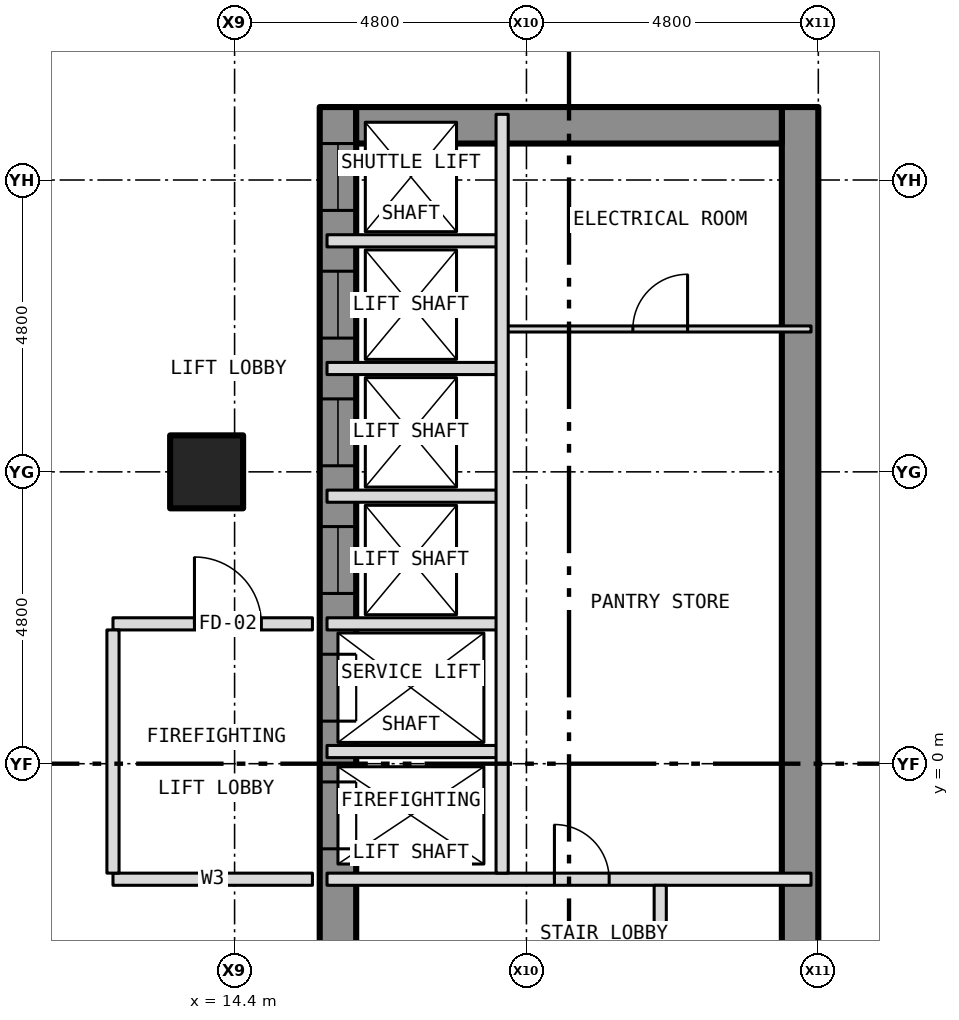
"""IFC4 building model, lengths in metres.
Left out: names, types, materials, properties, quantities, classifications, styles, units other than length and angle.
Written with IfcOpenShell. Run it as: python <this file> out.ifc"""

import sys

from ifc_helpers import new_model, si_unit, direction, frame, frame_2d, origin, origin_2d, place, context, subcontext, project, spatial, rectangle, hollow_rectangle, extrude, element, fill, save


model = new_model("IFC4")
c1 = context("Model", 3, precision=1e-05, world=origin(), true_north=direction((0.0, 1.0)))
c2 = subcontext(c1, "Body", "Model", "MODEL_VIEW")
j1 = project(units=[si_unit("LENGTHUNIT", "METRE"), si_unit("PLANEANGLEUNIT", "RADIAN")], contexts=[c1])
p1 = place(None, origin())
s1 = spatial("IfcSite", under=j1, at=p1, CompositionType="ELEMENT")
p2 = place(p1, origin())
s2 = spatial("IfcBuilding", under=s1, at=p2, CompositionType="ELEMENT")
p3 = place(p2, origin())
s3 = spatial("IfcBuildingStorey", under=s2, at=p3, CompositionType="ELEMENT", Elevation=0.0)
p4 = place(p3, frame((13.94, 4.8, -0.3), z_axis=(0.0, 0.0, 1.0), x_axis=(1.0, 0.0, 0.0)))
e1 = element("IfcColumn", 1, at=p4, inside=s3, PredefinedType="COLUMN", context=c2, shape_type="SweptSolid", body=[
    extrude(hollow_rectangle(XDim=1.2, YDim=1.2, WallThickness=0.07, at=origin_2d()), origin(), (0.0, 0.0, 1.0), 7.55),
])
p5 = place(p3, frame((16.1, -10.8, 0.0), z_axis=(0.0, 0.0, 1.0), x_axis=(0.0, 1.0, 0.0)))
e2 = element("IfcWall", 2, at=p5, inside=s3, PredefinedType="SHEAR", context=c2, shape_type="SweptSolid", body=[
    extrude(rectangle(XDim=21.6, YDim=0.6, at=frame_2d((10.8, 0.0))), origin(), (0.0, 0.0, 1.0), 7.2),
])
p6 = place(p5, frame((9.4, 0.0, 0.0)))
e3 = element("IfcOpeningElement", 3, at=p6, cuts=e2, PredefinedType="OPENING", context=c2, shape_type="SweptSolid", body=[
    extrude(rectangle(XDim=1.1, YDim=2.1, at=frame_2d((0.55, 1.05))), frame((0.0, 0.312, 0.0), z_axis=(0.0, -1.0, 0.0), x_axis=(1.0, 0.0, 0.0)), (0.0, 0.0, 1.0), 0.624),
])
p7 = place(p5, frame((11.5, 0.0, 0.0)))
e4 = element("IfcOpeningElement", 4, at=p7, cuts=e2, PredefinedType="OPENING", context=c2, shape_type="SweptSolid", body=[
    extrude(rectangle(XDim=1.1, YDim=2.1, at=frame_2d((0.55, 1.05))), frame((0.0, 0.312, 0.0), z_axis=(0.0, -1.0, 0.0), x_axis=(1.0, 0.0, 0.0)), (0.0, 0.0, 1.0), 0.624),
])
p8 = place(p5, frame((13.6, 0.0, 0.0)))
e5 = element("IfcOpeningElement", 5, at=p8, cuts=e2, PredefinedType="OPENING", context=c2, shape_type="SweptSolid", body=[
    extrude(rectangle(XDim=1.1, YDim=2.1, at=frame_2d((0.55, 1.05))), frame((0.0, 0.312, 0.0), z_axis=(0.0, -1.0, 0.0), x_axis=(1.0, 0.0, 0.0)), (0.0, 0.0, 1.0), 0.624),
])
p9 = place(p5, frame((15.7, 0.0, 0.0)))
e6 = element("IfcOpeningElement", 6, at=p9, cuts=e2, PredefinedType="OPENING", context=c2, shape_type="SweptSolid", body=[
    extrude(rectangle(XDim=1.1, YDim=2.1, at=frame_2d((0.55, 1.05))), frame((0.0, 0.312, 0.0), z_axis=(0.0, -1.0, 0.0), x_axis=(1.0, 0.0, 0.0)), (0.0, 0.0, 1.0), 0.624),
])
p10 = place(p5, frame((17.8, 0.0, 0.0)))
e7 = element("IfcOpeningElement", 7, at=p10, cuts=e2, PredefinedType="OPENING", context=c2, shape_type="SweptSolid", body=[
    extrude(rectangle(XDim=1.1, YDim=2.1, at=frame_2d((0.55, 1.05))), frame((0.0, 0.312, 0.0), z_axis=(0.0, -1.0, 0.0), x_axis=(1.0, 0.0, 0.0)), (0.0, 0.0, 1.0), 0.624),
])
p11 = place(p5, frame((19.9, 0.0, 0.0)))
e8 = element("IfcOpeningElement", 8, at=p11, cuts=e2, PredefinedType="OPENING", context=c2, shape_type="SweptSolid", body=[
    extrude(rectangle(XDim=1.1, YDim=2.1, at=frame_2d((0.55, 1.05))), frame((0.0, 0.312, 0.0), z_axis=(0.0, -1.0, 0.0), x_axis=(1.0, 0.0, 0.0)), (0.0, 0.0, 1.0), 0.624),
])
p12 = place(p3, frame((23.7, -10.8, 0.0), z_axis=(0.0, 0.0, 1.0), x_axis=(0.0, 1.0, 0.0)))
e9 = element("IfcWall", 9, at=p12, inside=s3, PredefinedType="SHEAR", context=c2, shape_type="SweptSolid", body=[
    extrude(rectangle(XDim=21.6, YDim=0.6, at=frame_2d((10.8, 0.0))), origin(), (0.0, 0.0, 1.0), 7.2),
])
p13 = place(p3, frame((16.4, 10.5, 0.0), z_axis=(0.0, 0.0, 1.0), x_axis=(1.0, 0.0, 0.0)))
e10 = element("IfcWall", 10, at=p13, inside=s3, PredefinedType="SHEAR", context=c2, shape_type="SweptSolid", body=[
    extrude(rectangle(XDim=7.0, YDim=0.6, at=frame_2d((3.5, 0.0))), origin(), (0.0, 0.0, 1.0), 7.2),
])
p14 = place(p3, frame((12.4, -1.9, 0.0), z_axis=(0.0, 0.0, 1.0), x_axis=(1.0, 0.0, 0.0)))
e11 = element("IfcWall", 11, at=p14, inside=s3, PredefinedType="PARTITIONING", context=c2, shape_type="SweptSolid", body=[
    extrude(rectangle(XDim=3.28, YDim=0.2, at=frame_2d((1.64, 0.0))), origin(), (0.0, 0.0, 1.0), 7.25),
])
p15 = place(p3, frame((15.92, -1.9, 0.0), z_axis=(0.0, 0.0, 1.0), x_axis=(1.0, 0.0, 0.0)))
e12 = element("IfcWall", 12, at=p15, inside=s3, PredefinedType="PARTITIONING", context=c2, shape_type="SweptSolid", body=[
    extrude(rectangle(XDim=7.96, YDim=0.2, at=frame_2d((3.98, 0.0))), origin(), (0.0, 0.0, 1.0), 7.2),
])
p16 = place(p15, frame((3.74, 0.0, 0.0)))
e13 = element("IfcOpeningElement", 13, at=p16, cuts=e12, PredefinedType="OPENING", context=c2, shape_type="SweptSolid", body=[
    extrude(rectangle(XDim=0.9, YDim=2.1, at=frame_2d((0.45, 1.05))), frame((0.0, 0.112, 0.0), z_axis=(0.0, -1.0, 0.0), x_axis=(1.0, 0.0, 0.0)), (0.0, 0.0, 1.0), 0.224),
])
p17 = place(p3, frame((15.92, 0.2, 0.0), z_axis=(0.0, 0.0, 1.0), x_axis=(1.0, 0.0, 0.0)))
e14 = element("IfcWall", 14, at=p17, inside=s3, PredefinedType="PARTITIONING", context=c2, shape_type="SweptSolid", body=[
    extrude(rectangle(XDim=2.88, YDim=0.2, at=frame_2d((1.44, 0.0))), origin(), (0.0, 0.0, 1.0), 7.2),
])
p18 = place(p3, frame((12.4, 2.3, 0.0), z_axis=(0.0, 0.0, 1.0), x_axis=(1.0, 0.0, 0.0)))
e15 = element("IfcWall", 15, at=p18, inside=s3, PredefinedType="PARTITIONING", context=c2, shape_type="SweptSolid", body=[
    extrude(rectangle(XDim=3.28, YDim=0.2, at=frame_2d((1.64, 0.0))), origin(), (0.0, 0.0, 1.0), 7.25),
])
p19 = place(p18, frame((1.34, 0.0, 0.0)))
e16 = element("IfcOpeningElement", 16, at=p19, cuts=e15, PredefinedType="OPENING", context=c2, shape_type="SweptSolid", body=[
    extrude(rectangle(XDim=1.1, YDim=2.1, at=frame_2d((0.55, 1.05))), frame((0.0, 0.112, 0.0), z_axis=(0.0, -1.0, 0.0), x_axis=(1.0, 0.0, 0.0)), (0.0, 0.0, 1.0), 0.224),
])
for number, where, z_axis, x_axis in (
    (17, (15.92, 2.3, 0.0), (0.0, 0.0, 1.0), (1.0, 0.0, 0.0)),
    (18, (15.92, 4.4, 0.0), (0.0, 0.0, 1.0), (1.0, 0.0, 0.0)),
    (19, (15.92, 6.5, 0.0), (0.0, 0.0, 1.0), (1.0, 0.0, 0.0)),
):
    element("IfcWall", number, at=place(p3, frame(where, z_axis=z_axis, x_axis=x_axis)), inside=s3, PredefinedType="PARTITIONING", context=c2, shape_type="SweptSolid", body=[
        extrude(rectangle(XDim=2.88, YDim=0.2, at=frame_2d((1.44, 0.0))), origin(), (0.0, 0.0, 1.0), 7.2),
    ])
p20 = place(p3, frame((18.8, 7.15, 0.0), z_axis=(0.0, 0.0, 1.0), x_axis=(1.0, 0.0, 0.0)))
e20 = element("IfcWall", 20, at=p20, inside=s3, PredefinedType="PARTITIONING", context=c2, shape_type="SweptSolid", body=[
    extrude(rectangle(XDim=5.08, YDim=0.1, at=frame_2d((2.54, 0.0))), origin(), (0.0, 0.0, 1.0), 7.2),
])
p21 = place(p20, frame((2.15, 0.0, 0.0)))
e21 = element("IfcOpeningElement", 21, at=p21, cuts=e20, PredefinedType="OPENING", context=c2, shape_type="SweptSolid", body=[
    extrude(rectangle(XDim=0.9, YDim=2.1, at=frame_2d((0.45, 1.05))), frame((0.0, 0.062, 0.0), z_axis=(0.0, -1.0, 0.0), x_axis=(1.0, 0.0, 0.0)), (0.0, 0.0, 1.0), 0.124),
])
p22 = place(p3, frame((15.92, 8.6, 0.0), z_axis=(0.0, 0.0, 1.0), x_axis=(1.0, 0.0, 0.0)))
e22 = element("IfcWall", 22, at=p22, inside=s3, PredefinedType="PARTITIONING", context=c2, shape_type="SweptSolid", body=[
    extrude(rectangle(XDim=2.88, YDim=0.2, at=frame_2d((1.44, 0.0))), origin(), (0.0, 0.0, 1.0), 7.2),
])
p23 = place(p3, frame((12.4, -1.8, 0.0), z_axis=(0.0, 0.0, 1.0), x_axis=(0.0, 1.0, 0.0)))
e23 = element("IfcWall", 23, at=p23, inside=s3, PredefinedType="PARTITIONING", context=c2, shape_type="SweptSolid", body=[
    extrude(rectangle(XDim=4.0, YDim=0.2, at=frame_2d((2.0, 0.0))), origin(), (0.0, 0.0, 1.0), 7.25),
])
p24 = place(p3, frame((18.8, -1.8, 0.0), z_axis=(0.0, 0.0, 1.0), x_axis=(0.0, 1.0, 0.0)))
e24 = element("IfcWall", 24, at=p24, inside=s3, PredefinedType="PARTITIONING", context=c2, shape_type="SweptSolid", body=[
    extrude(rectangle(XDim=12.48, YDim=0.2, at=frame_2d((6.24, 0.0))), origin(), (0.0, 0.0, 1.0), 7.2),
])
p25 = place(p3, frame((21.4, -10.68, 0.0), z_axis=(0.0, 0.0, 1.0), x_axis=(0.0, 1.0, 0.0)))
e25 = element("IfcWall", 25, at=p25, inside=s3, PredefinedType="PARTITIONING", context=c2, shape_type="SweptSolid", body=[
    extrude(rectangle(XDim=8.68, YDim=0.2, at=frame_2d((4.34, 0.0))), origin(), (0.0, 0.0, 1.0), 7.2),
])
p26 = place(p25, frame((5.66, 0.0, 0.0)))
e26 = element("IfcOpeningElement", 26, at=p26, cuts=e25, PredefinedType="OPENING", context=c2, shape_type="SweptSolid", body=[
    extrude(rectangle(XDim=0.9, YDim=2.1, at=frame_2d((0.45, 1.05))), frame((0.0, 0.112, 0.0), z_axis=(0.0, -1.0, 0.0), x_axis=(1.0, 0.0, 0.0)), (0.0, 0.0, 1.0), 0.224),
])
p27 = place(p25, frame((0.74, 0.0, 0.0)))
e27 = element("IfcOpeningElement", 27, at=p27, cuts=e25, PredefinedType="OPENING", context=c2, shape_type="SweptSolid", body=[
    extrude(rectangle(XDim=1.1, YDim=2.1, at=frame_2d((0.55, 1.05))), frame((0.0, 0.112, 0.0), z_axis=(0.0, -1.0, 0.0), x_axis=(1.0, 0.0, 0.0)), (0.0, 0.0, 1.0), 0.224),
])
p28 = place(p6, origin())
e28 = element("IfcDoor", 28, at=p28, inside=s3, OperationType="SLIDING_TO_LEFT", PredefinedType="DOOR", context=c2, shape_type="SweptSolid", body=[
    extrude(rectangle(XDim=1.1, YDim=2.1, at=frame_2d((0.55, 1.05))), frame((0.0, 0.025, 0.0), z_axis=(0.0, -1.0, 0.0), x_axis=(1.0, 0.0, 0.0)), (0.0, 0.0, 1.0), 0.05),
])
fill(e3, e28)
p29 = place(p7, origin())
e29 = element("IfcDoor", 29, at=p29, inside=s3, OperationType="SLIDING_TO_LEFT", PredefinedType="DOOR", context=c2, shape_type="SweptSolid", body=[
    extrude(rectangle(XDim=1.1, YDim=2.1, at=frame_2d((0.55, 1.05))), frame((0.0, 0.025, 0.0), z_axis=(0.0, -1.0, 0.0), x_axis=(1.0, 0.0, 0.0)), (0.0, 0.0, 1.0), 0.05),
])
fill(e4, e29)
p30 = place(p8, origin())
e30 = element("IfcDoor", 30, at=p30, inside=s3, OperationType="SLIDING_TO_LEFT", PredefinedType="DOOR", context=c2, shape_type="SweptSolid", body=[
    extrude(rectangle(XDim=1.1, YDim=2.1, at=frame_2d((0.55, 1.05))), frame((0.0, 0.025, 0.0), z_axis=(0.0, -1.0, 0.0), x_axis=(1.0, 0.0, 0.0)), (0.0, 0.0, 1.0), 0.05),
])
fill(e5, e30)
p31 = place(p9, origin())
e31 = element("IfcDoor", 31, at=p31, inside=s3, OperationType="SLIDING_TO_LEFT", PredefinedType="DOOR", context=c2, shape_type="SweptSolid", body=[
    extrude(rectangle(XDim=1.1, YDim=2.1, at=frame_2d((0.55, 1.05))), frame((0.0, 0.025, 0.0), z_axis=(0.0, -1.0, 0.0), x_axis=(1.0, 0.0, 0.0)), (0.0, 0.0, 1.0), 0.05),
])
fill(e6, e31)
p32 = place(p10, origin())
e32 = element("IfcDoor", 32, at=p32, inside=s3, OperationType="SLIDING_TO_LEFT", PredefinedType="DOOR", context=c2, shape_type="SweptSolid", body=[
    extrude(rectangle(XDim=1.1, YDim=2.1, at=frame_2d((0.55, 1.05))), frame((0.0, 0.025, 0.0), z_axis=(0.0, -1.0, 0.0), x_axis=(1.0, 0.0, 0.0)), (0.0, 0.0, 1.0), 0.05),
])
fill(e7, e32)
p33 = place(p11, origin())
e33 = element("IfcDoor", 33, at=p33, inside=s3, OperationType="SLIDING_TO_LEFT", PredefinedType="DOOR", context=c2, shape_type="SweptSolid", body=[
    extrude(rectangle(XDim=1.1, YDim=2.1, at=frame_2d((0.55, 1.05))), frame((0.0, 0.025, 0.0), z_axis=(0.0, -1.0, 0.0), x_axis=(1.0, 0.0, 0.0)), (0.0, 0.0, 1.0), 0.05),
])
fill(e8, e33)
p34 = place(p16, origin())
e34 = element("IfcDoor", 34, at=p34, inside=s3, OperationType="SINGLE_SWING_LEFT", PredefinedType="DOOR", context=c2, shape_type="SweptSolid", body=[
    extrude(rectangle(XDim=0.9, YDim=2.1, at=frame_2d((0.45, 1.05))), frame((0.0, 0.025, 0.0), z_axis=(0.0, -1.0, 0.0), x_axis=(1.0, 0.0, 0.0)), (0.0, 0.0, 1.0), 0.05),
])
fill(e13, e34)
p35 = place(p21, origin())
e35 = element("IfcDoor", 35, at=p35, inside=s3, OperationType="SINGLE_SWING_RIGHT", PredefinedType="DOOR", context=c2, shape_type="SweptSolid", body=[
    extrude(rectangle(XDim=0.9, YDim=2.1, at=frame_2d((0.45, 1.05))), frame((0.0, 0.025, 0.0), z_axis=(0.0, -1.0, 0.0), x_axis=(1.0, 0.0, 0.0)), (0.0, 0.0, 1.0), 0.05),
])
fill(e21, e35)
p36 = place(p19, origin())
e36 = element("IfcDoor", 36, at=p36, inside=s3, OperationType="SINGLE_SWING_LEFT", PredefinedType="DOOR", context=c2, shape_type="SweptSolid", body=[
    extrude(rectangle(XDim=1.1, YDim=2.1, at=frame_2d((0.55, 1.05))), frame((0.0, 0.025, 0.0), z_axis=(0.0, -1.0, 0.0), x_axis=(1.0, 0.0, 0.0)), (0.0, 0.0, 1.0), 0.05),
])
fill(e16, e36)
save(model, sys.argv[1])
